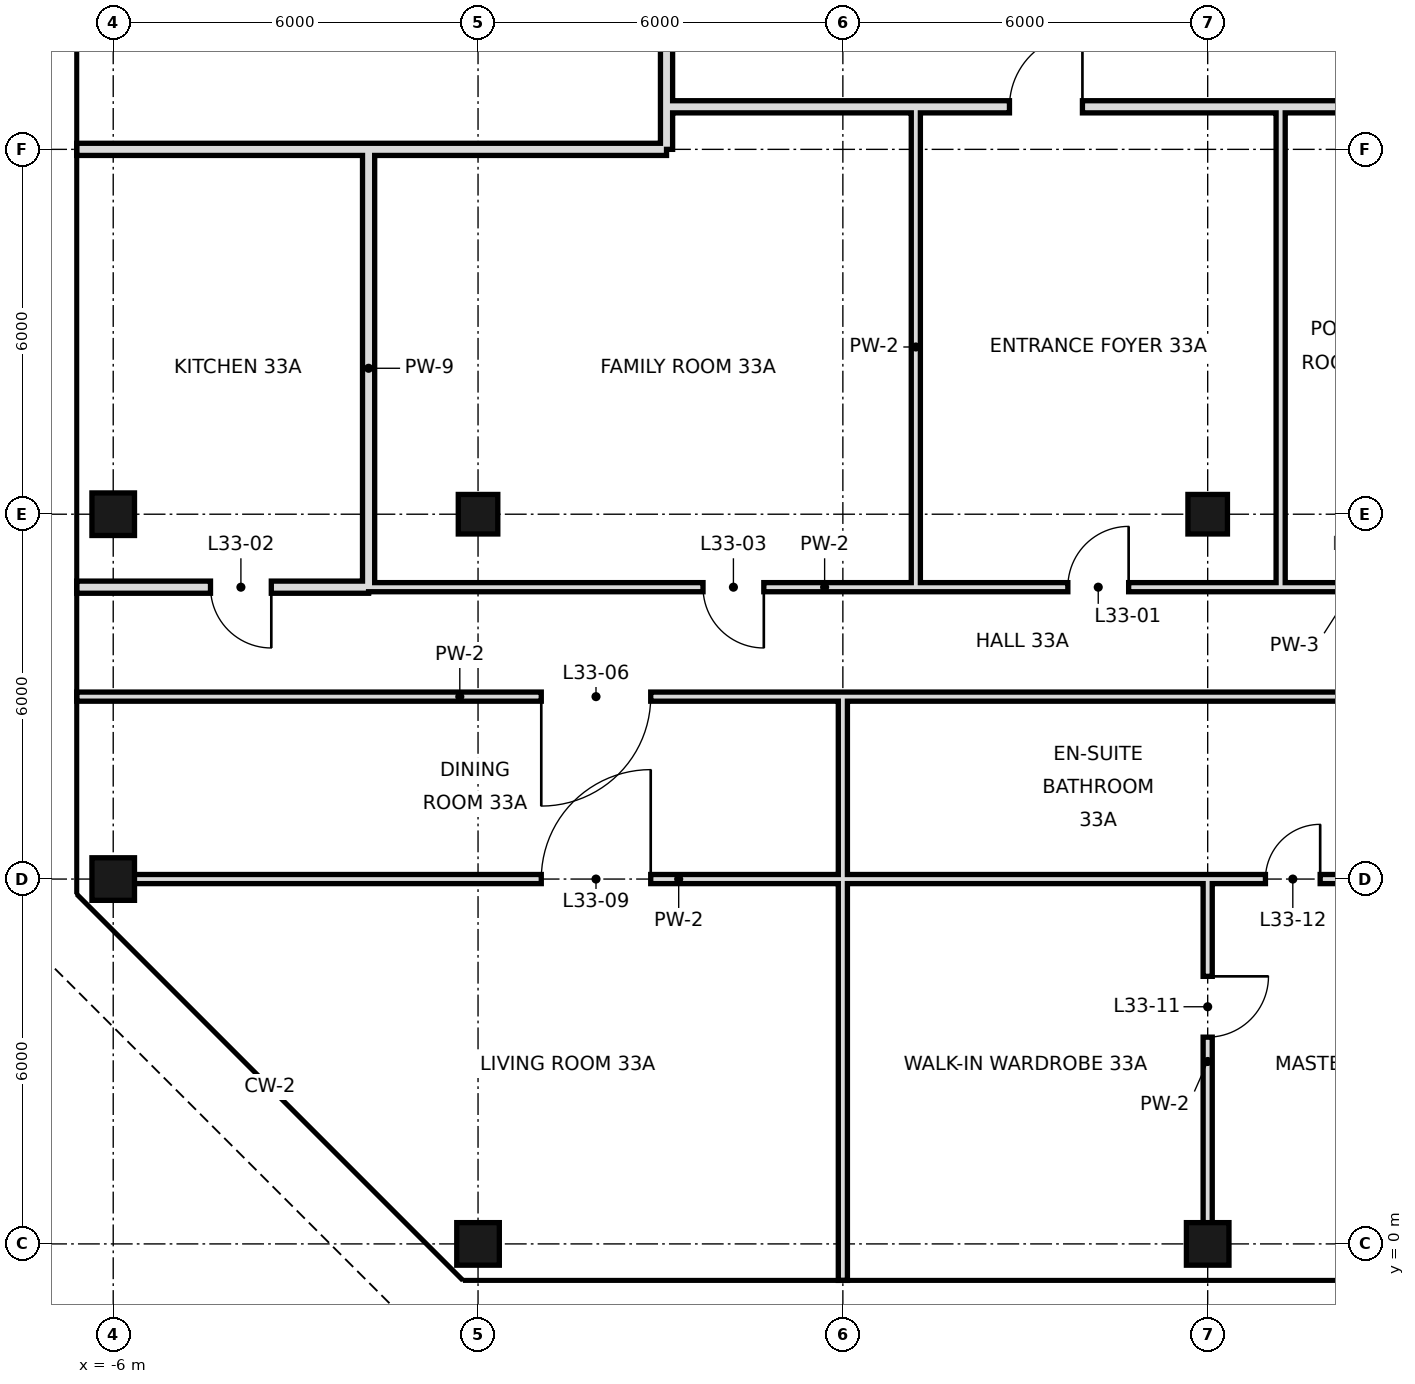
"""IFC4 building model, lengths in metres.
Left out: names, types, materials, properties, quantities, classifications, styles, units other than length and angle.
Written with IfcOpenShell. Run it as: python <this file> out.ifc"""

import sys

from ifc_helpers import new_model, si_unit, direction, frame, frame_2d, origin, origin_2d, place, context, subcontext, project, spatial, rectangle, hollow_rectangle, extrude, element, fill, save


model = new_model("IFC4")
c1 = context("Model", 3, precision=1e-05, world=origin(), true_north=direction((0.0, 1.0)))
c2 = subcontext(c1, "Body", "Model", "MODEL_VIEW")
j1 = project(units=[si_unit("LENGTHUNIT", "METRE"), si_unit("PLANEANGLEUNIT", "RADIAN")], contexts=[c1])
p1 = place(None, origin())
s1 = spatial("IfcSite", under=j1, at=p1, CompositionType="ELEMENT")
p2 = place(p1, origin())
s2 = spatial("IfcBuilding", under=s1, at=p2, CompositionType="ELEMENT")
p3 = place(p2, frame((0.0, 0.0, 147.4)))
s3 = spatial("IfcBuildingStorey", under=s2, at=p3, CompositionType="ELEMENT", Elevation=147.4)
for number, where, z_axis, x_axis in (
    (1, (-6.0, 6.0, 0.0), (0.0, 0.0, 1.0), (1.0, 0.0, 0.0)),
    (2, (-6.0, 12.0, 0.0), (0.0, 0.0, 1.0), (1.0, 0.0, 0.0)),
    (3, (0.0, 0.0, 0.0), (0.0, 0.0, 1.0), (1.0, 0.0, 0.0)),
):
    element("IfcColumn", number, at=place(p3, frame(where, z_axis=z_axis, x_axis=x_axis)), inside=s3, PredefinedType="COLUMN", context=c2, shape_type="SweptSolid", body=[
        extrude(hollow_rectangle(XDim=0.7, YDim=0.7, WallThickness=0.036, at=origin_2d()), origin(), (0.0, 0.0, 1.0), 3.6),
    ])
p4 = place(p3, frame((0.0, 12.0, 0.0), z_axis=(0.0, 0.0, 1.0), x_axis=(1.0, 0.0, 0.0)))
e4 = element("IfcColumn", 4, at=p4, inside=s3, PredefinedType="COLUMN", context=c2, shape_type="SweptSolid", body=[
    extrude(hollow_rectangle(XDim=0.65, YDim=0.65, WallThickness=0.032, at=origin_2d()), origin(), (0.0, 0.0, 1.0), 3.6),
])
p5 = place(p3, frame((12.0, 0.0, 0.0), z_axis=(0.0, 0.0, 1.0), x_axis=(1.0, 0.0, 0.0)))
e5 = element("IfcColumn", 5, at=p5, inside=s3, PredefinedType="COLUMN", context=c2, shape_type="SweptSolid", body=[
    extrude(hollow_rectangle(XDim=0.7, YDim=0.7, WallThickness=0.036, at=origin_2d()), origin(), (0.0, 0.0, 1.0), 3.6),
])
p6 = place(p3, frame((12.0, 12.0, 0.0), z_axis=(0.0, 0.0, 1.0), x_axis=(1.0, 0.0, 0.0)))
e6 = element("IfcColumn", 6, at=p6, inside=s3, PredefinedType="COLUMN", context=c2, shape_type="SweptSolid", body=[
    extrude(hollow_rectangle(XDim=0.65, YDim=0.65, WallThickness=0.032, at=origin_2d()), origin(), (0.0, 0.0, 1.0), 3.6),
])
p7 = place(p3, frame((-1.8, 10.8, 0.0), z_axis=(0.0, 0.0, 1.0), x_axis=(0.0, 1.0, 0.0)))
e7 = element("IfcWall", 7, at=p7, inside=s3, PredefinedType="SOLIDWALL", context=c2, shape_type="SweptSolid", body=[
    extrude(rectangle(XDim=7.2, YDim=0.2, at=frame_2d((3.6, 0.0))), origin(), (0.0, 0.0, 1.0), 3.42),
])
p8 = place(p3, frame((12.0, 0.0, 0.0), z_axis=(0.0, 0.0, 1.0), x_axis=(0.0, 1.0, 0.0)))
e8 = element("IfcWall", 8, at=p8, inside=s3, PredefinedType="PARTITIONING", context=c2, shape_type="SweptSolid", body=[
    extrude(rectangle(XDim=6.0, YDim=0.15, at=frame_2d((3.0, 0.0))), origin(), (0.0, 0.0, 1.0), 2.72),
])
p9 = place(p8, frame((3.4, 0.0, 0.0)))
e9 = element("IfcOpeningElement", 9, at=p9, cuts=e8, PredefinedType="OPENING", context=c2, shape_type="SweptSolid", body=[
    extrude(rectangle(XDim=1.0, YDim=2.4, at=frame_2d((0.5, 1.2))), frame((0.0, 0.085, 0.0), z_axis=(0.0, -1.0, 0.0), x_axis=(1.0, 0.0, 0.0)), (0.0, 0.0, 1.0), 0.17),
])
p10 = place(p3, frame((13.2, 10.8, 0.0), z_axis=(0.0, 0.0, 1.0), x_axis=(0.0, 1.0, 0.0)))
e10 = element("IfcWall", 10, at=p10, inside=s3, PredefinedType="PARTITIONING", context=c2, shape_type="SweptSolid", body=[
    extrude(rectangle(XDim=7.9, YDim=0.15, at=frame_2d((3.95, 0.0))), origin(), (0.0, 0.0, 1.0), 3.42),
])
p11 = place(p3, frame((3.1, 18.0, 0.0), z_axis=(0.0, 0.0, 1.0), x_axis=(0.0, 1.0, 0.0)))
e11 = element("IfcWall", 11, at=p11, inside=s3, PredefinedType="SOLIDWALL", context=c2, shape_type="SweptSolid", body=[
    extrude(rectangle(XDim=30.6, YDim=0.2, at=frame_2d((15.3, 0.0))), origin(), (0.0, 0.0, 1.0), 2.72),
])
p12 = place(p11, frame((20.27, 0.0, 0.0)))
e12 = element("IfcOpeningElement", 12, at=p12, cuts=e11, PredefinedType="OPENING", context=c2, shape_type="SweptSolid", body=[
    extrude(rectangle(XDim=1.2, YDim=2.4, at=frame_2d((0.6, 1.2))), frame((0.0, 0.11, 0.0), z_axis=(0.0, -1.0, 0.0), x_axis=(1.0, 0.0, 0.0)), (0.0, 0.0, 1.0), 0.22),
])
p13 = place(p3, frame((6.0, -0.6, 0.0), z_axis=(0.0, 0.0, 1.0), x_axis=(0.0, 1.0, 0.0)))
e13 = element("IfcWall", 13, at=p13, inside=s3, PredefinedType="PARTITIONING", context=c2, shape_type="SweptSolid", body=[
    extrude(rectangle(XDim=6.6, YDim=0.15, at=frame_2d((3.3, 0.0))), origin(), (0.0, 0.0, 1.0), 2.72),
])
p14 = place(p3, frame((6.0, 6.0, 0.0), z_axis=(0.0, 0.0, 1.0), x_axis=(0.0, 1.0, 0.0)))
e14 = element("IfcWall", 14, at=p14, inside=s3, PredefinedType="PARTITIONING", context=c2, shape_type="SweptSolid", body=[
    extrude(rectangle(XDim=3.0, YDim=0.15, at=frame_2d((1.5, 0.0))), origin(), (0.0, 0.0, 1.0), 2.72),
])
p15 = place(p3, frame((7.2, 10.8, 0.0), z_axis=(0.0, 0.0, 1.0), x_axis=(0.0, 1.0, 0.0)))
e15 = element("IfcWall", 15, at=p15, inside=s3, PredefinedType="PARTITIONING", context=c2, shape_type="SweptSolid", body=[
    extrude(rectangle(XDim=7.9, YDim=0.15, at=frame_2d((3.95, 0.0))), origin(), (0.0, 0.0, 1.0), 3.42),
])
p16 = place(p3, frame((-6.6, 10.8, 0.0), z_axis=(0.0, 0.0, 1.0), x_axis=(1.0, 0.0, 0.0)))
e16 = element("IfcWall", 16, at=p16, inside=s3, PredefinedType="SOLIDWALL", context=c2, shape_type="SweptSolid", body=[
    extrude(rectangle(XDim=4.8, YDim=0.2, at=frame_2d((2.4, 0.0))), origin(), (0.0, 0.0, 1.0), 2.97),
])
p17 = place(p16, frame((2.2, 0.0, 0.0)))
e17 = element("IfcOpeningElement", 17, at=p17, cuts=e16, PredefinedType="OPENING", context=c2, shape_type="SweptSolid", body=[
    extrude(rectangle(XDim=1.0, YDim=2.4, at=frame_2d((0.5, 1.2))), frame((0.0, 0.11, 0.0), z_axis=(0.0, -1.0, 0.0), x_axis=(1.0, 0.0, 0.0)), (0.0, 0.0, 1.0), 0.22),
])
p18 = place(p3, frame((-1.8, 10.8, 0.0), z_axis=(0.0, 0.0, 1.0), x_axis=(1.0, 0.0, 0.0)))
e18 = element("IfcWall", 18, at=p18, inside=s3, PredefinedType="PARTITIONING", context=c2, shape_type="SweptSolid", body=[
    extrude(rectangle(XDim=15.0, YDim=0.15, at=frame_2d((7.5, 0.0))), origin(), (0.0, 0.0, 1.0), 3.42),
])
p19 = place(p18, frame((11.5, 0.0, 0.0)))
e19 = element("IfcOpeningElement", 19, at=p19, cuts=e18, PredefinedType="OPENING", context=c2, shape_type="SweptSolid", body=[
    extrude(rectangle(XDim=1.0, YDim=2.4, at=frame_2d((0.5, 1.2))), frame((0.0, 0.085, 0.0), z_axis=(0.0, -1.0, 0.0), x_axis=(1.0, 0.0, 0.0)), (0.0, 0.0, 1.0), 0.17),
])
p20 = place(p18, frame((5.5, 0.0, 0.0)))
e20 = element("IfcOpeningElement", 20, at=p20, cuts=e18, PredefinedType="OPENING", context=c2, shape_type="SweptSolid", body=[
    extrude(rectangle(XDim=1.0, YDim=2.4, at=frame_2d((0.5, 1.2))), frame((0.0, 0.085, 0.0), z_axis=(0.0, -1.0, 0.0), x_axis=(1.0, 0.0, 0.0)), (0.0, 0.0, 1.0), 0.17),
])
p21 = place(p3, frame((13.2, 10.8, 0.0), z_axis=(0.0, 0.0, 1.0), x_axis=(1.0, 0.0, 0.0)))
e21 = element("IfcWall", 21, at=p21, inside=s3, PredefinedType="PARTITIONING", context=c2, shape_type="SweptSolid", body=[
    extrude(rectangle(XDim=2.4, YDim=0.15, at=frame_2d((1.2, 0.0))), origin(), (0.0, 0.0, 1.0), 3.42),
])
p22 = place(p21, frame((0.95, 0.0, 0.0)))
e22 = element("IfcOpeningElement", 22, at=p22, cuts=e21, PredefinedType="OPENING", context=c2, shape_type="SweptSolid", body=[
    extrude(rectangle(XDim=0.9, YDim=2.4, at=frame_2d((0.45, 1.2))), frame((0.0, 0.085, 0.0), z_axis=(0.0, -1.0, 0.0), x_axis=(1.0, 0.0, 0.0)), (0.0, 0.0, 1.0), 0.17),
])
p23 = place(p3, frame((-1.8, 18.0, 0.0), z_axis=(0.0, 0.0, 1.0), x_axis=(1.0, 0.0, 0.0)))
e23 = element("IfcWall", 23, at=p23, inside=s3, PredefinedType="SOLIDWALL", context=c2, shape_type="SweptSolid", body=[
    extrude(rectangle(XDim=4.9, YDim=0.2, at=frame_2d((2.45, 0.0))), origin(), (0.0, 0.0, 1.0), 2.72),
])
p24 = place(p3, frame((-6.6, 18.0, 0.0), z_axis=(0.0, 0.0, 1.0), x_axis=(1.0, 0.0, 0.0)))
e24 = element("IfcWall", 24, at=p24, inside=s3, PredefinedType="SOLIDWALL", context=c2, shape_type="SweptSolid", body=[
    extrude(rectangle(XDim=4.8, YDim=0.2, at=frame_2d((2.4, 0.0))), origin(), (0.0, 0.0, 1.0), 2.72),
])
p25 = place(p3, frame((3.1, 18.7, 0.0), z_axis=(0.0, 0.0, 1.0), x_axis=(1.0, 0.0, 0.0)))
e25 = element("IfcWall", 25, at=p25, inside=s3, PredefinedType="SOLIDWALL", context=c2, shape_type="SweptSolid", body=[
    extrude(rectangle(XDim=41.8, YDim=0.2, at=frame_2d((20.9, 0.0))), origin(), (0.0, 0.0, 1.0), 2.72),
])
p26 = place(p25, frame((5.64, 0.0, 0.0)))
e26 = element("IfcOpeningElement", 26, at=p26, cuts=e25, PredefinedType="OPENING", context=c2, shape_type="SweptSolid", body=[
    extrude(rectangle(XDim=1.2, YDim=2.4, at=frame_2d((0.6, 1.2))), frame((0.0, 0.11, 0.0), z_axis=(0.0, -1.0, 0.0), x_axis=(1.0, 0.0, 0.0)), (0.0, 0.0, 1.0), 0.22),
])
p27 = place(p25, frame((24.16, 0.0, 0.0)))
e27 = element("IfcOpeningElement", 27, at=p27, cuts=e25, PredefinedType="OPENING", context=c2, shape_type="SweptSolid", body=[
    extrude(rectangle(XDim=1.2, YDim=2.4, at=frame_2d((0.6, 1.2))), frame((0.0, 0.11, 0.0), z_axis=(0.0, -1.0, 0.0), x_axis=(1.0, 0.0, 0.0)), (0.0, 0.0, 1.0), 0.22),
])
p28 = place(p3, frame((-6.0, 6.0, 0.0), z_axis=(0.0, 0.0, 1.0), x_axis=(1.0, 0.0, 0.0)))
e28 = element("IfcWall", 28, at=p28, inside=s3, PredefinedType="PARTITIONING", context=c2, shape_type="SweptSolid", body=[
    extrude(rectangle(XDim=12.0, YDim=0.15, at=frame_2d((6.0, 0.0))), origin(), (0.0, 0.0, 1.0), 2.97),
])
p29 = place(p28, frame((7.04, 0.0, 0.0)))
e29 = element("IfcOpeningElement", 29, at=p29, cuts=e28, PredefinedType="OPENING", context=c2, shape_type="SweptSolid", body=[
    extrude(rectangle(XDim=1.8, YDim=2.4, at=frame_2d((0.9, 1.2))), frame((0.0, 0.085, 0.0), z_axis=(0.0, -1.0, 0.0), x_axis=(1.0, 0.0, 0.0)), (0.0, 0.0, 1.0), 0.17),
])
p30 = place(p3, frame((6.0, 6.0, 0.0), z_axis=(0.0, 0.0, 1.0), x_axis=(1.0, 0.0, 0.0)))
e30 = element("IfcWall", 30, at=p30, inside=s3, PredefinedType="PARTITIONING", context=c2, shape_type="SweptSolid", body=[
    extrude(rectangle(XDim=8.4, YDim=0.15, at=frame_2d((4.2, 0.0))), origin(), (0.0, 0.0, 1.0), 2.97),
])
p31 = place(p30, frame((6.95, 0.0, 0.0)))
e31 = element("IfcOpeningElement", 31, at=p31, cuts=e30, PredefinedType="OPENING", context=c2, shape_type="SweptSolid", body=[
    extrude(rectangle(XDim=0.9, YDim=2.4, at=frame_2d((0.45, 1.2))), frame((0.0, 0.085, 0.0), z_axis=(0.0, -1.0, 0.0), x_axis=(1.0, 0.0, 0.0)), (0.0, 0.0, 1.0), 0.17),
])
p32 = place(p3, frame((-6.6, 9.0, 0.0), z_axis=(0.0, 0.0, 1.0), x_axis=(1.0, 0.0, 0.0)))
e32 = element("IfcWall", 32, at=p32, inside=s3, PredefinedType="PARTITIONING", context=c2, shape_type="SweptSolid", body=[
    extrude(rectangle(XDim=12.6, YDim=0.15, at=frame_2d((6.3, 0.0))), origin(), (0.0, 0.0, 1.0), 3.42),
])
p33 = place(p32, frame((7.64, 0.0, 0.0)))
e33 = element("IfcOpeningElement", 33, at=p33, cuts=e32, PredefinedType="OPENING", context=c2, shape_type="SweptSolid", body=[
    extrude(rectangle(XDim=1.8, YDim=2.4, at=frame_2d((0.9, 1.2))), frame((0.0, 0.085, 0.0), z_axis=(0.0, -1.0, 0.0), x_axis=(1.0, 0.0, 0.0)), (0.0, 0.0, 1.0), 0.17),
])
p34 = place(p3, frame((6.0, 9.0, 0.0), z_axis=(0.0, 0.0, 1.0), x_axis=(1.0, 0.0, 0.0)))
e34 = element("IfcWall", 34, at=p34, inside=s3, PredefinedType="PARTITIONING", context=c2, shape_type="SweptSolid", body=[
    extrude(rectangle(XDim=8.4, YDim=0.15, at=frame_2d((4.2, 0.0))), origin(), (0.0, 0.0, 1.0), 3.42),
])
p35 = place(p19, frame((1.0, 0.0, 0.0), z_axis=(0.0, 0.0, 1.0), x_axis=(-1.0, 0.0, 0.0)))
e35 = element("IfcDoor", 35, at=p35, inside=s3, OperationType="SINGLE_SWING_LEFT", PredefinedType="DOOR", context=c2, shape_type="SweptSolid", body=[
    extrude(rectangle(XDim=1.0, YDim=2.4, at=frame_2d((0.5, 1.2))), frame((0.0, 0.025, 0.0), z_axis=(0.0, -1.0, 0.0), x_axis=(1.0, 0.0, 0.0)), (0.0, 0.0, 1.0), 0.05),
])
fill(e19, e35)
p36 = place(p17, origin())
e36 = element("IfcDoor", 36, at=p36, inside=s3, OperationType="SINGLE_SWING_RIGHT", PredefinedType="DOOR", context=c2, shape_type="SweptSolid", body=[
    extrude(rectangle(XDim=1.0, YDim=2.4, at=frame_2d((0.5, 1.2))), frame((0.0, 0.025, 0.0), z_axis=(0.0, -1.0, 0.0), x_axis=(1.0, 0.0, 0.0)), (0.0, 0.0, 1.0), 0.05),
])
fill(e17, e36)
p37 = place(p20, origin())
e37 = element("IfcDoor", 37, at=p37, inside=s3, OperationType="SINGLE_SWING_RIGHT", PredefinedType="DOOR", context=c2, shape_type="SweptSolid", body=[
    extrude(rectangle(XDim=1.0, YDim=2.4, at=frame_2d((0.5, 1.2))), frame((0.0, 0.025, 0.0), z_axis=(0.0, -1.0, 0.0), x_axis=(1.0, 0.0, 0.0)), (0.0, 0.0, 1.0), 0.05),
])
fill(e20, e37)
p38 = place(p33, frame((1.8, 0.0, 0.0), z_axis=(0.0, 0.0, 1.0), x_axis=(-1.0, 0.0, 0.0)))
e38 = element("IfcDoor", 38, at=p38, inside=s3, OperationType="SINGLE_SWING_RIGHT", PredefinedType="DOOR", context=c2, shape_type="SweptSolid", body=[
    extrude(rectangle(XDim=1.8, YDim=2.4, at=frame_2d((0.9, 1.2))), frame((0.0, 0.025, 0.0), z_axis=(0.0, -1.0, 0.0), x_axis=(1.0, 0.0, 0.0)), (0.0, 0.0, 1.0), 0.05),
])
fill(e33, e38)
p39 = place(p29, frame((1.8, 0.0, 0.0), z_axis=(0.0, 0.0, 1.0), x_axis=(-1.0, 0.0, 0.0)))
e39 = element("IfcDoor", 39, at=p39, inside=s3, OperationType="SINGLE_SWING_LEFT", PredefinedType="DOOR", context=c2, shape_type="SweptSolid", body=[
    extrude(rectangle(XDim=1.8, YDim=2.4, at=frame_2d((0.9, 1.2))), frame((0.0, 0.025, 0.0), z_axis=(0.0, -1.0, 0.0), x_axis=(1.0, 0.0, 0.0)), (0.0, 0.0, 1.0), 0.05),
])
fill(e29, e39)
p40 = place(p9, origin())
e40 = element("IfcDoor", 40, at=p40, inside=s3, OperationType="SINGLE_SWING_RIGHT", PredefinedType="DOOR", context=c2, shape_type="SweptSolid", body=[
    extrude(rectangle(XDim=1.0, YDim=2.4, at=frame_2d((0.5, 1.2))), frame((0.0, 0.025, 0.0), z_axis=(0.0, -1.0, 0.0), x_axis=(1.0, 0.0, 0.0)), (0.0, 0.0, 1.0), 0.05),
])
fill(e9, e40)
p41 = place(p31, frame((0.9, 0.0, 0.0), z_axis=(0.0, 0.0, 1.0), x_axis=(-1.0, 0.0, 0.0)))
e41 = element("IfcDoor", 41, at=p41, inside=s3, OperationType="SINGLE_SWING_LEFT", PredefinedType="DOOR", context=c2, shape_type="SweptSolid", body=[
    extrude(rectangle(XDim=0.9, YDim=2.4, at=frame_2d((0.45, 1.2))), frame((0.0, 0.025, 0.0), z_axis=(0.0, -1.0, 0.0), x_axis=(1.0, 0.0, 0.0)), (0.0, 0.0, 1.0), 0.05),
])
fill(e31, e41)
p42 = place(p26, frame((1.2, 0.0, 0.0), z_axis=(0.0, 0.0, 1.0), x_axis=(-1.0, 0.0, 0.0)))
e42 = element("IfcDoor", 42, at=p42, inside=s3, OperationType="SINGLE_SWING_LEFT", PredefinedType="DOOR", context=c2, shape_type="SweptSolid", body=[
    extrude(rectangle(XDim=1.2, YDim=2.4, at=frame_2d((0.6, 1.2))), frame((0.0, 0.025, 0.0), z_axis=(0.0, -1.0, 0.0), x_axis=(1.0, 0.0, 0.0)), (0.0, 0.0, 1.0), 0.05),
])
fill(e26, e42)
save(model, sys.argv[1])
